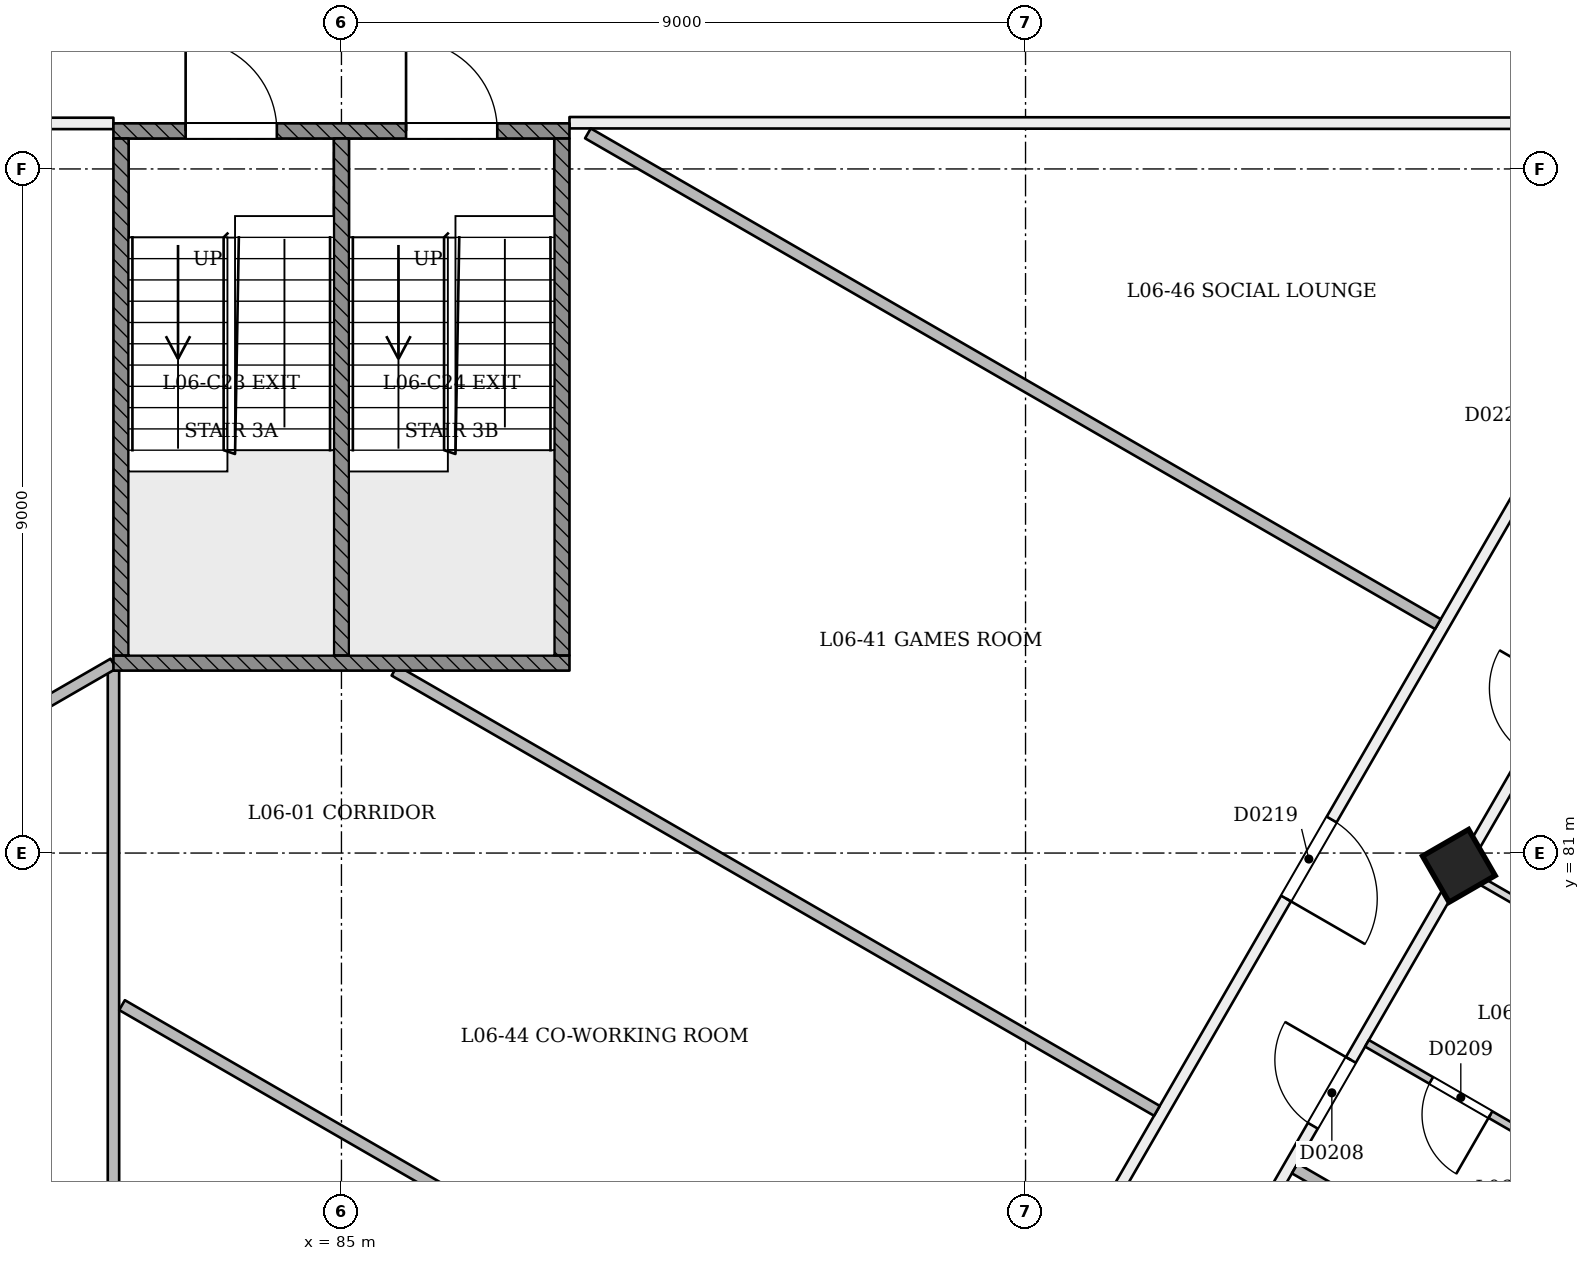
"""IFC4 building model, lengths in metres.
Left out: names, types, materials, properties, quantities, classifications, styles, units other than length and angle.
Written with IfcOpenShell. Run it as: python <this file> out.ifc"""

import sys

from ifc_helpers import new_model, si_unit, direction, frame, frame_2d, origin, origin_2d, place, context, subcontext, project, spatial, rectangle, extrude, element, fill, save


model = new_model("IFC4")
c1 = context("Model", 3, precision=1e-05, world=origin(), true_north=direction((0.0, 1.0)))
c2 = subcontext(c1, "Body", "Model", "MODEL_VIEW")
j1 = project(units=[si_unit("LENGTHUNIT", "METRE"), si_unit("PLANEANGLEUNIT", "RADIAN")], contexts=[c1])
p1 = place(None, origin())
s1 = spatial("IfcSite", under=j1, at=p1, CompositionType="ELEMENT")
p2 = place(p1, origin())
s2 = spatial("IfcBuilding", under=s1, at=p2, CompositionType="ELEMENT")
p3 = place(p2, frame((0.0, 0.0, 30.6)))
s3 = spatial("IfcBuildingStorey", under=s2, at=p3, CompositionType="ELEMENT", Elevation=30.6)
p4 = place(p3, frame((99.728, 80.785, -0.021), z_axis=(-0.02215519141, 0.038415882353, 0.999016199807), x_axis=(-0.500657429676, -0.865361475843, 0.022173277538)))
e1 = element("IfcColumn", 1, at=p4, inside=s3, PredefinedType="COLUMN", context=c2, shape_type="SweptSolid", body=[
    extrude(rectangle(XDim=0.7, YDim=0.7, at=origin_2d()), origin(), (0.0, 0.0, 1.0), 3.604),
])
p5 = place(p3, frame((61.273, 96.374, 0.0), z_axis=(0.0, 0.0, 1.0), x_axis=(0.5000018851, -0.866024315419, 0.0)))
e2 = element("IfcWall", 2, at=p5, inside=s3, PredefinedType="PARTITIONING", context=c2, shape_type="SweptSolid", body=[
    extrude(rectangle(XDim=45.0, YDim=0.15, at=frame_2d((22.5, 0.0))), origin(), (0.0, 0.0, 1.0), 2.7),
])
p6 = place(p5, frame((2.829, 0.0, 0.0)))
e3 = element("IfcOpeningElement", 3, at=p6, cuts=e2, PredefinedType="OPENING", context=c2, shape_type="SweptSolid", body=[
    extrude(rectangle(XDim=1.1, YDim=2.1, at=frame_2d((0.55, 1.05))), frame((0.0, 0.085, 0.0), z_axis=(0.0, -1.0, 0.0), x_axis=(1.0, 0.0, 0.0)), (0.0, 0.0, 1.0), 0.171),
])
p7 = place(p5, frame((7.3, 0.0, 0.0)))
e4 = element("IfcOpeningElement", 4, at=p7, cuts=e2, PredefinedType="OPENING", context=c2, shape_type="SweptSolid", body=[
    extrude(rectangle(XDim=1.2, YDim=2.1, at=frame_2d((0.6, 1.05))), frame((0.0, 0.085, 0.0), z_axis=(0.0, -1.0, 0.0), x_axis=(1.0, 0.0, 0.0)), (0.0, 0.0, 1.0), 0.171),
])
p8 = place(p5, frame((14.22, 0.0, 0.0)))
e5 = element("IfcOpeningElement", 5, at=p8, cuts=e2, PredefinedType="OPENING", context=c2, shape_type="SweptSolid", body=[
    extrude(rectangle(XDim=1.0, YDim=2.1, at=frame_2d((0.5, 1.05))), frame((0.0, 0.085, 0.0), z_axis=(0.0, -1.0, 0.0), x_axis=(1.0, 0.0, 0.0)), (0.0, 0.0, 1.0), 0.171),
])
p9 = place(p5, frame((20.895, 0.0, 0.0)))
e6 = element("IfcOpeningElement", 6, at=p9, cuts=e2, PredefinedType="OPENING", context=c2, shape_type="SweptSolid", body=[
    extrude(rectangle(XDim=1.0, YDim=2.1, at=frame_2d((0.5, 1.05))), frame((0.0, 0.085, 0.0), z_axis=(0.0, -1.0, 0.0), x_axis=(1.0, 0.0, 0.0)), (0.0, 0.0, 1.0), 0.171),
])
p10 = place(p5, frame((24.25, 0.0, 0.0)))
e7 = element("IfcOpeningElement", 7, at=p10, cuts=e2, PredefinedType="OPENING", context=c2, shape_type="SweptSolid", body=[
    extrude(rectangle(XDim=1.0, YDim=2.1, at=frame_2d((0.5, 1.05))), frame((0.0, 0.085, 0.0), z_axis=(0.0, -1.0, 0.0), x_axis=(1.0, 0.0, 0.0)), (0.0, 0.0, 1.0), 0.171),
])
p11 = place(p5, frame((29.78, 0.0, 0.0)))
e8 = element("IfcOpeningElement", 8, at=p11, cuts=e2, PredefinedType="OPENING", context=c2, shape_type="SweptSolid", body=[
    extrude(rectangle(XDim=1.0, YDim=2.1, at=frame_2d((0.5, 1.05))), frame((0.0, 0.085, 0.0), z_axis=(0.0, -1.0, 0.0), x_axis=(1.0, 0.0, 0.0)), (0.0, 0.0, 1.0), 0.171),
])
p12 = place(p5, frame((34.3, 0.0, 0.0)))
e9 = element("IfcOpeningElement", 9, at=p12, cuts=e2, PredefinedType="OPENING", context=c2, shape_type="SweptSolid", body=[
    extrude(rectangle(XDim=1.2, YDim=2.1, at=frame_2d((0.6, 1.05))), frame((0.0, 0.085, 0.0), z_axis=(0.0, -1.0, 0.0), x_axis=(1.0, 0.0, 0.0)), (0.0, 0.0, 1.0), 0.171),
])
p13 = place(p5, frame((41.22, 0.0, 0.0)))
e10 = element("IfcOpeningElement", 10, at=p13, cuts=e2, PredefinedType="OPENING", context=c2, shape_type="SweptSolid", body=[
    extrude(rectangle(XDim=1.0, YDim=2.1, at=frame_2d((0.5, 1.05))), frame((0.0, 0.085, 0.0), z_axis=(0.0, -1.0, 0.0), x_axis=(1.0, 0.0, 0.0)), (0.0, 0.0, 1.0), 0.171),
])
p14 = place(p3, frame((86.227, 57.403, 0.0), z_axis=(0.0, 0.0, 1.0), x_axis=(0.5000018851, 0.866024315419, 0.0)))
e11 = element("IfcWall", 11, at=p14, inside=s3, PredefinedType="PARTITIONING", context=c2, shape_type="SweptSolid", body=[
    extrude(rectangle(XDim=45.0, YDim=0.15, at=frame_2d((22.5, 0.0))), origin(), (0.0, 0.0, 1.0), 2.7),
])
p15 = place(p14, frame((0.72, 0.0, 0.0)))
e12 = element("IfcOpeningElement", 12, at=p15, cuts=e11, PredefinedType="OPENING", context=c2, shape_type="SweptSolid", body=[
    extrude(rectangle(XDim=1.0, YDim=2.1, at=frame_2d((0.5, 1.05))), frame((0.0, 0.085, 0.0), z_axis=(0.0, -1.0, 0.0), x_axis=(1.0, 0.0, 0.0)), (0.0, 0.0, 1.0), 0.171),
])
p16 = place(p14, frame((5.22, 0.0, 0.0)))
e13 = element("IfcOpeningElement", 13, at=p16, cuts=e11, PredefinedType="OPENING", context=c2, shape_type="SweptSolid", body=[
    extrude(rectangle(XDim=1.0, YDim=2.1, at=frame_2d((0.5, 1.05))), frame((0.0, 0.085, 0.0), z_axis=(0.0, -1.0, 0.0), x_axis=(1.0, 0.0, 0.0)), (0.0, 0.0, 1.0), 0.171),
])
p17 = place(p14, frame((11.78, 0.0, 0.0)))
e14 = element("IfcOpeningElement", 14, at=p17, cuts=e11, PredefinedType="OPENING", context=c2, shape_type="SweptSolid", body=[
    extrude(rectangle(XDim=1.0, YDim=2.1, at=frame_2d((0.5, 1.05))), frame((0.0, 0.085, 0.0), z_axis=(0.0, -1.0, 0.0), x_axis=(1.0, 0.0, 0.0)), (0.0, 0.0, 1.0), 0.171),
])
p18 = place(p14, frame((14.22, 0.0, 0.0)))
e15 = element("IfcOpeningElement", 15, at=p18, cuts=e11, PredefinedType="OPENING", context=c2, shape_type="SweptSolid", body=[
    extrude(rectangle(XDim=1.0, YDim=2.1, at=frame_2d((0.5, 1.05))), frame((0.0, 0.085, 0.0), z_axis=(0.0, -1.0, 0.0), x_axis=(1.0, 0.0, 0.0)), (0.0, 0.0, 1.0), 0.171),
])
p19 = place(p14, frame((19.75, 0.0, 0.0)))
e16 = element("IfcOpeningElement", 16, at=p19, cuts=e11, PredefinedType="OPENING", context=c2, shape_type="SweptSolid", body=[
    extrude(rectangle(XDim=1.0, YDim=2.1, at=frame_2d((0.5, 1.05))), frame((0.0, 0.085, 0.0), z_axis=(0.0, -1.0, 0.0), x_axis=(1.0, 0.0, 0.0)), (0.0, 0.0, 1.0), 0.171),
])
p20 = place(p14, frame((23.105, 0.0, 0.0)))
e17 = element("IfcOpeningElement", 17, at=p20, cuts=e11, PredefinedType="OPENING", context=c2, shape_type="SweptSolid", body=[
    extrude(rectangle(XDim=1.0, YDim=2.1, at=frame_2d((0.5, 1.05))), frame((0.0, 0.085, 0.0), z_axis=(0.0, -1.0, 0.0), x_axis=(1.0, 0.0, 0.0)), (0.0, 0.0, 1.0), 0.171),
])
p21 = place(p14, frame((28.75, 0.0, 0.0)))
e18 = element("IfcOpeningElement", 18, at=p21, cuts=e11, PredefinedType="OPENING", context=c2, shape_type="SweptSolid", body=[
    extrude(rectangle(XDim=1.0, YDim=2.1, at=frame_2d((0.5, 1.05))), frame((0.0, 0.085, 0.0), z_axis=(0.0, -1.0, 0.0), x_axis=(1.0, 0.0, 0.0)), (0.0, 0.0, 1.0), 0.171),
])
p22 = place(p14, frame((32.105, 0.0, 0.0)))
e19 = element("IfcOpeningElement", 19, at=p22, cuts=e11, PredefinedType="OPENING", context=c2, shape_type="SweptSolid", body=[
    extrude(rectangle(XDim=1.0, YDim=2.1, at=frame_2d((0.5, 1.05))), frame((0.0, 0.085, 0.0), z_axis=(0.0, -1.0, 0.0), x_axis=(1.0, 0.0, 0.0)), (0.0, 0.0, 1.0), 0.171),
])
p23 = place(p14, frame((36.504, 0.0, 0.0)))
e20 = element("IfcOpeningElement", 20, at=p23, cuts=e11, PredefinedType="OPENING", context=c2, shape_type="SweptSolid", body=[
    extrude(rectangle(XDim=1.0, YDim=2.1, at=frame_2d((0.5, 1.05))), frame((0.0, 0.085, 0.0), z_axis=(0.0, -1.0, 0.0), x_axis=(1.0, 0.0, 0.0)), (0.0, 0.0, 1.0), 0.171),
])
p24 = place(p14, frame((38.654, 0.0, 0.0)))
e21 = element("IfcOpeningElement", 21, at=p24, cuts=e11, PredefinedType="OPENING", context=c2, shape_type="SweptSolid", body=[
    extrude(rectangle(XDim=1.0, YDim=2.1, at=frame_2d((0.5, 1.05))), frame((0.0, 0.085, 0.0), z_axis=(0.0, -1.0, 0.0), x_axis=(1.0, 0.0, 0.0)), (0.0, 0.0, 1.0), 0.171),
])
p25 = place(p14, frame((41.071, 0.0, 0.0)))
e22 = element("IfcOpeningElement", 22, at=p25, cuts=e11, PredefinedType="OPENING", context=c2, shape_type="SweptSolid", body=[
    extrude(rectangle(XDim=1.1, YDim=2.1, at=frame_2d((0.55, 1.05))), frame((0.0, 0.085, 0.0), z_axis=(0.0, -1.0, 0.0), x_axis=(1.0, 0.0, 0.0)), (0.0, 0.0, 1.0), 0.171),
])
p26 = place(p3, frame((103.315, 90.6, 0.0), z_axis=(0.0, 0.0, 1.0), x_axis=(-0.499999056994, -0.866025948229, 0.0)))
e23 = element("IfcWall", 23, at=p26, inside=s3, PredefinedType="PARTITIONING", context=c2, shape_type="SweptSolid", body=[
    extrude(rectangle(XDim=36.292, YDim=0.15, at=frame_2d((18.146, 0.0))), origin(), (0.0, 0.0, 1.0), 3.1),
])
p27 = place(p26, frame((10.576, 0.0, 0.0)))
e24 = element("IfcOpeningElement", 24, at=p27, cuts=e23, PredefinedType="OPENING", context=c2, shape_type="SweptSolid", body=[
    extrude(rectangle(XDim=1.2, YDim=2.1, at=frame_2d((0.6, 1.05))), frame((0.0, 0.085, 0.0), z_axis=(0.0, -1.0, 0.0), x_axis=(1.0, 0.0, 0.0)), (0.0, 0.0, 1.0), 0.171),
])
p28 = place(p26, frame((28.59, 0.0, 0.0)))
e25 = element("IfcOpeningElement", 25, at=p28, cuts=e23, PredefinedType="OPENING", context=c2, shape_type="SweptSolid", body=[
    extrude(rectangle(XDim=1.2, YDim=2.1, at=frame_2d((0.6, 1.05))), frame((0.0, 0.085, 0.0), z_axis=(0.0, -1.0, 0.0), x_axis=(1.0, 0.0, 0.0)), (0.0, 0.0, 1.0), 0.171),
])
p29 = place(p26, frame((17.248, 0.0, 0.0)))
e26 = element("IfcOpeningElement", 26, at=p29, cuts=e23, PredefinedType="OPENING", context=c2, shape_type="SweptSolid", body=[
    extrude(rectangle(XDim=1.2, YDim=2.1, at=frame_2d((0.6, 1.05))), frame((0.0, 0.085, 0.0), z_axis=(0.0, -1.0, 0.0), x_axis=(1.0, 0.0, 0.0)), (0.0, 0.0, 1.0), 0.171),
])
p30 = place(p26, frame((4.5, 0.0, 0.0)))
e27 = element("IfcOpeningElement", 27, at=p30, cuts=e23, PredefinedType="OPENING", context=c2, shape_type="SweptSolid", body=[
    extrude(rectangle(XDim=1.2, YDim=2.1, at=frame_2d((0.6, 1.05))), frame((0.0, 0.085, 0.0), z_axis=(0.0, -1.0, 0.0), x_axis=(1.0, 0.0, 0.0)), (0.0, 0.0, 1.0), 0.171),
])
p31 = place(p26, frame((21.947, 0.0, 0.0)))
e28 = element("IfcOpeningElement", 28, at=p31, cuts=e23, PredefinedType="OPENING", context=c2, shape_type="SweptSolid", body=[
    extrude(rectangle(XDim=1.2, YDim=2.1, at=frame_2d((0.6, 1.05))), frame((0.0, 0.085, 0.0), z_axis=(0.0, -1.0, 0.0), x_axis=(1.0, 0.0, 0.0)), (0.0, 0.0, 1.0), 0.171),
])
p32 = place(p3, frame((84.831, 59.171, 0.0), z_axis=(0.0, 0.0, 1.0), x_axis=(-0.499999056994, 0.866025948229, 0.0)))
e29 = element("IfcWall", 29, at=p32, inside=s3, PredefinedType="PARTITIONING", context=c2, shape_type="SweptSolid", body=[
    extrude(rectangle(XDim=36.292, YDim=0.15, at=frame_2d((18.146, 0.0))), origin(), (0.0, 0.0, 1.0), 3.1),
])
p33 = place(p32, frame((16.276, 0.0, 0.0)))
e30 = element("IfcOpeningElement", 30, at=p33, cuts=e29, PredefinedType="OPENING", context=c2, shape_type="SweptSolid", body=[
    extrude(rectangle(XDim=1.2, YDim=2.1, at=frame_2d((0.6, 1.05))), frame((0.0, 0.085, 0.0), z_axis=(0.0, -1.0, 0.0), x_axis=(1.0, 0.0, 0.0)), (0.0, 0.0, 1.0), 0.171),
])
p34 = place(p32, frame((27.931, 0.0, 0.0)))
e31 = element("IfcOpeningElement", 31, at=p34, cuts=e29, PredefinedType="OPENING", context=c2, shape_type="SweptSolid", body=[
    extrude(rectangle(XDim=1.2, YDim=2.1, at=frame_2d((0.6, 1.05))), frame((0.0, 0.085, 0.0), z_axis=(0.0, -1.0, 0.0), x_axis=(1.0, 0.0, 0.0)), (0.0, 0.0, 1.0), 0.171),
])
p35 = place(p3, frame((88.0, 90.608, 0.0), z_axis=(0.0, 0.0, 1.0), x_axis=(0.999999859256, -0.000530555079, 0.0)))
e32 = element("IfcWall", 32, at=p35, inside=s3, PredefinedType="PARTITIONING", context=c2, shape_type="SweptSolid", body=[
    extrude(rectangle(XDim=15.185, YDim=0.15, at=frame_2d((7.593, 0.0))), origin(), (0.0, 0.0, 1.0), 3.1),
])
p36 = place(p3, frame((66.815, 90.6, 0.0), z_axis=(0.0, 0.0, 1.0), x_axis=(0.999999997932, -6.4309715e-05, 0.0)))
e33 = element("IfcWall", 33, at=p36, inside=s3, PredefinedType="PARTITIONING", context=c2, shape_type="SweptSolid", body=[
    extrude(rectangle(XDim=15.185, YDim=0.15, at=frame_2d((7.593, 0.0))), origin(), (0.0, 0.0, 1.0), 3.1),
])
p37 = place(p36, frame((11.492, 0.0, 0.0)))
e34 = element("IfcOpeningElement", 34, at=p37, cuts=e33, PredefinedType="OPENING", context=c2, shape_type="SweptSolid", body=[
    extrude(rectangle(XDim=1.2, YDim=2.1, at=frame_2d((0.6, 1.05))), frame((0.0, 0.085, 0.0), z_axis=(0.0, -1.0, 0.0), x_axis=(1.0, 0.0, 0.0)), (0.0, 0.0, 1.0), 0.171),
])
p38 = place(p3, frame((103.037, 73.678, 0.0), z_axis=(0.0, 0.0, 1.0), x_axis=(-0.866025401434, 0.500000004071, 0.0)))
e35 = element("IfcWall", 35, at=p38, inside=s3, PredefinedType="PARTITIONING", context=c2, shape_type="SweptSolid", body=[
    extrude(rectangle(XDim=6.345, YDim=0.15, at=frame_2d((3.173, 0.0))), origin(), (0.0, 0.0, 1.0), 2.6),
])
p39 = place(p3, frame((101.025, 77.034, 0.0), z_axis=(0.0, 0.0, 1.0), x_axis=(-0.865989585315, 0.500062034277, 0.0)))
e36 = element("IfcWall", 36, at=p39, inside=s3, PredefinedType="PARTITIONING", context=c2, shape_type="SweptSolid", body=[
    extrude(rectangle(XDim=2.925, YDim=0.1, at=frame_2d((1.462, 0.0))), origin(), (0.0, 0.0, 1.0), 3.1),
])
p40 = place(p39, frame((1.05, 0.0, 0.0)))
e37 = element("IfcOpeningElement", 37, at=p40, cuts=e36, PredefinedType="OPENING", context=c2, shape_type="SweptSolid", body=[
    extrude(rectangle(XDim=0.9, YDim=2.1, at=frame_2d((0.45, 1.05))), frame((0.0, 0.061, 0.0), z_axis=(0.0, -1.0, 0.0), x_axis=(1.0, 0.0, 0.0)), (0.0, 0.0, 1.0), 0.121),
])
p41 = place(p3, frame((102.343, 79.276, 0.0), z_axis=(0.0, 0.0, 1.0), x_axis=(-0.866046160531, 0.499964046536, 0.0)))
e38 = element("IfcWall", 38, at=p41, inside=s3, PredefinedType="PARTITIONING", context=c2, shape_type="SweptSolid", body=[
    extrude(rectangle(XDim=2.945, YDim=0.1, at=frame_2d((1.473, 0.0))), origin(), (0.0, 0.0, 1.0), 2.7),
])
p42 = place(p3, frame((85.698, 83.4, 0.0), z_axis=(0.0, 0.0, 1.0), x_axis=(0.866020254168, -0.500008919292, 0.0)))
e39 = element("IfcWall", 39, at=p42, inside=s3, PredefinedType="PARTITIONING", context=c2, shape_type="SweptSolid", body=[
    extrude(rectangle(XDim=11.582, YDim=0.15, at=frame_2d((5.791, 0.0))), origin(), (0.0, 0.0, 1.0), 3.1),
])
p43 = place(p3, frame((99.425, 84.012, 0.0), z_axis=(0.0, 0.0, 1.0), x_axis=(-0.866028468914, 0.499994691002, 0.0)))
e40 = element("IfcWall", 40, at=p43, inside=s3, PredefinedType="PARTITIONING", context=c2, shape_type="SweptSolid", body=[
    extrude(rectangle(XDim=12.912, YDim=0.15, at=frame_2d((6.456, 0.0))), origin(), (0.0, 0.0, 1.0), 3.1),
])
p44 = place(p3, frame((82.0, 64.352, 0.0), z_axis=(0.0, 0.0, 1.0), x_axis=(0.0, 1.0, 0.0)))
e41 = element("IfcWall", 41, at=p44, inside=s3, PredefinedType="PARTITIONING", context=c2, shape_type="SweptSolid", body=[
    extrude(rectangle(XDim=19.048, YDim=0.15, at=frame_2d((9.524, 0.0))), origin(), (0.0, 0.0, 1.0), 3.1),
])
p45 = place(p3, frame((82.0, 83.491, 0.0), z_axis=(0.0, 0.0, 1.0), x_axis=(-0.866018469749, -0.500012009909, 0.0)))
e42 = element("IfcWall", 42, at=p45, inside=s3, PredefinedType="PARTITIONING", context=c2, shape_type="SweptSolid", body=[
    extrude(rectangle(XDim=9.634, YDim=0.15, at=frame_2d((4.817, 0.0))), origin(), (0.0, 0.0, 1.0), 3.1),
])
p46 = place(p3, frame((82.113, 78.999, 0.0), z_axis=(0.0, 0.0, 1.0), x_axis=(0.866025387892, -0.500000027526, 0.0)))
e43 = element("IfcWall", 43, at=p46, inside=s3, PredefinedType="PARTITIONING", context=c2, shape_type="SweptSolid", body=[
    extrude(rectangle(XDim=12.486, YDim=0.15, at=frame_2d((6.243, 0.0))), origin(), (0.0, 0.0, 1.0), 3.1),
])
p47 = place(p3, frame((82.0, 90.5, 0.0), z_axis=(0.0, 0.0, 1.0), x_axis=(1.0, 0.0, 0.0)))
e44 = element("IfcWall", 44, at=p47, inside=s3, PredefinedType="SOLIDWALL", context=c2, shape_type="SweptSolid", body=[
    extrude(rectangle(XDim=6.0, YDim=0.2, at=frame_2d((3.0, 0.0))), origin(), (0.0, 0.0, 1.0), 3.1),
])
p48 = place(p47, frame((0.95, 0.0, 0.0)))
e45 = element("IfcOpeningElement", 45, at=p48, cuts=e44, PredefinedType="OPENING", context=c2, shape_type="SweptSolid", body=[
    extrude(rectangle(XDim=1.2, YDim=2.1, at=frame_2d((0.6, 1.05))), frame((0.0, 0.11, 0.0), z_axis=(0.0, -1.0, 0.0), x_axis=(1.0, 0.0, 0.0)), (0.0, 0.0, 1.0), 0.221),
])
p49 = place(p47, frame((3.85, 0.0, 0.0)))
e46 = element("IfcOpeningElement", 46, at=p49, cuts=e44, PredefinedType="OPENING", context=c2, shape_type="SweptSolid", body=[
    extrude(rectangle(XDim=1.2, YDim=2.1, at=frame_2d((0.6, 1.05))), frame((0.0, 0.11, 0.0), z_axis=(0.0, -1.0, 0.0), x_axis=(1.0, 0.0, 0.0)), (0.0, 0.0, 1.0), 0.221),
])
p50 = place(p3, frame((82.0, 83.5, 0.0), z_axis=(0.0, 0.0, 1.0), x_axis=(1.0, 0.0, 0.0)))
e47 = element("IfcWall", 47, at=p50, inside=s3, PredefinedType="SOLIDWALL", context=c2, shape_type="SweptSolid", body=[
    extrude(rectangle(XDim=6.0, YDim=0.2, at=frame_2d((3.0, 0.0))), origin(), (0.0, 0.0, 1.0), 3.1),
])
for number, where, z_axis, x_axis in (
    (48, (82.1, 83.6, 0.0), (0.0, 0.0, 1.0), (0.0, 1.0, 0.0)),
    (49, (87.9, 83.6, 0.0), (0.0, 0.0, 1.0), (0.0, 1.0, 0.0)),
    (50, (85.0, 83.6, 0.0), (0.0, 0.0, 1.0), (0.0, 1.0, 0.0)),
):
    element("IfcWall", number, at=place(p3, frame(where, z_axis=z_axis, x_axis=x_axis)), inside=s3, PredefinedType="SOLIDWALL", context=c2, shape_type="SweptSolid", body=[
        extrude(rectangle(XDim=6.8, YDim=0.2, at=frame_2d((3.4, 0.0))), origin(), (0.0, 0.0, 1.0), 3.1),
    ])
p51 = place(p20, origin())
e51 = element("IfcDoor", 51, at=p51, inside=s3, OperationType="SINGLE_SWING_RIGHT", PredefinedType="NOTDEFINED", context=c2, shape_type="SweptSolid", body=[
    extrude(rectangle(XDim=1.0, YDim=2.1, at=frame_2d((0.5, 1.05))), frame((0.0, 0.025, 0.0), z_axis=(0.0, -1.0, 0.0), x_axis=(1.0, 0.0, 0.0)), (0.0, 0.0, 1.0), 0.05),
])
fill(e17, e51)
p52 = place(p40, origin())
e52 = element("IfcDoor", 52, at=p52, inside=s3, OperationType="SINGLE_SWING_LEFT", PredefinedType="NOTDEFINED", context=c2, shape_type="SweptSolid", body=[
    extrude(rectangle(XDim=0.9, YDim=2.1, at=frame_2d((0.45, 1.05))), frame((0.0, 0.025, 0.0), z_axis=(0.0, -1.0, 0.0), x_axis=(1.0, 0.0, 0.0)), (0.0, 0.0, 1.0), 0.05),
])
fill(e37, e52)
p53 = place(p27, origin())
e53 = element("IfcDoor", 53, at=p53, inside=s3, OperationType="SINGLE_SWING_RIGHT", PredefinedType="NOTDEFINED", context=c2, shape_type="SweptSolid", body=[
    extrude(rectangle(XDim=1.2, YDim=2.1, at=frame_2d((0.6, 1.05))), frame((0.0, 0.025, 0.0), z_axis=(0.0, -1.0, 0.0), x_axis=(1.0, 0.0, 0.0)), (0.0, 0.0, 1.0), 0.05),
])
fill(e24, e53)
p54 = place(p48, origin())
e54 = element("IfcDoor", 54, at=p54, inside=s3, OperationType="SINGLE_SWING_LEFT", PredefinedType="NOTDEFINED", context=c2, shape_type="SweptSolid", body=[
    extrude(rectangle(XDim=1.2, YDim=2.1, at=frame_2d((0.6, 1.05))), frame((0.0, 0.025, 0.0), z_axis=(0.0, -1.0, 0.0), x_axis=(1.0, 0.0, 0.0)), (0.0, 0.0, 1.0), 0.05),
])
fill(e45, e54)
p55 = place(p49, origin())
e55 = element("IfcDoor", 55, at=p55, inside=s3, OperationType="SINGLE_SWING_LEFT", PredefinedType="NOTDEFINED", context=c2, shape_type="SweptSolid", body=[
    extrude(rectangle(XDim=1.2, YDim=2.1, at=frame_2d((0.6, 1.05))), frame((0.0, 0.025, 0.0), z_axis=(0.0, -1.0, 0.0), x_axis=(1.0, 0.0, 0.0)), (0.0, 0.0, 1.0), 0.05),
])
fill(e46, e55)
save(model, sys.argv[1])
